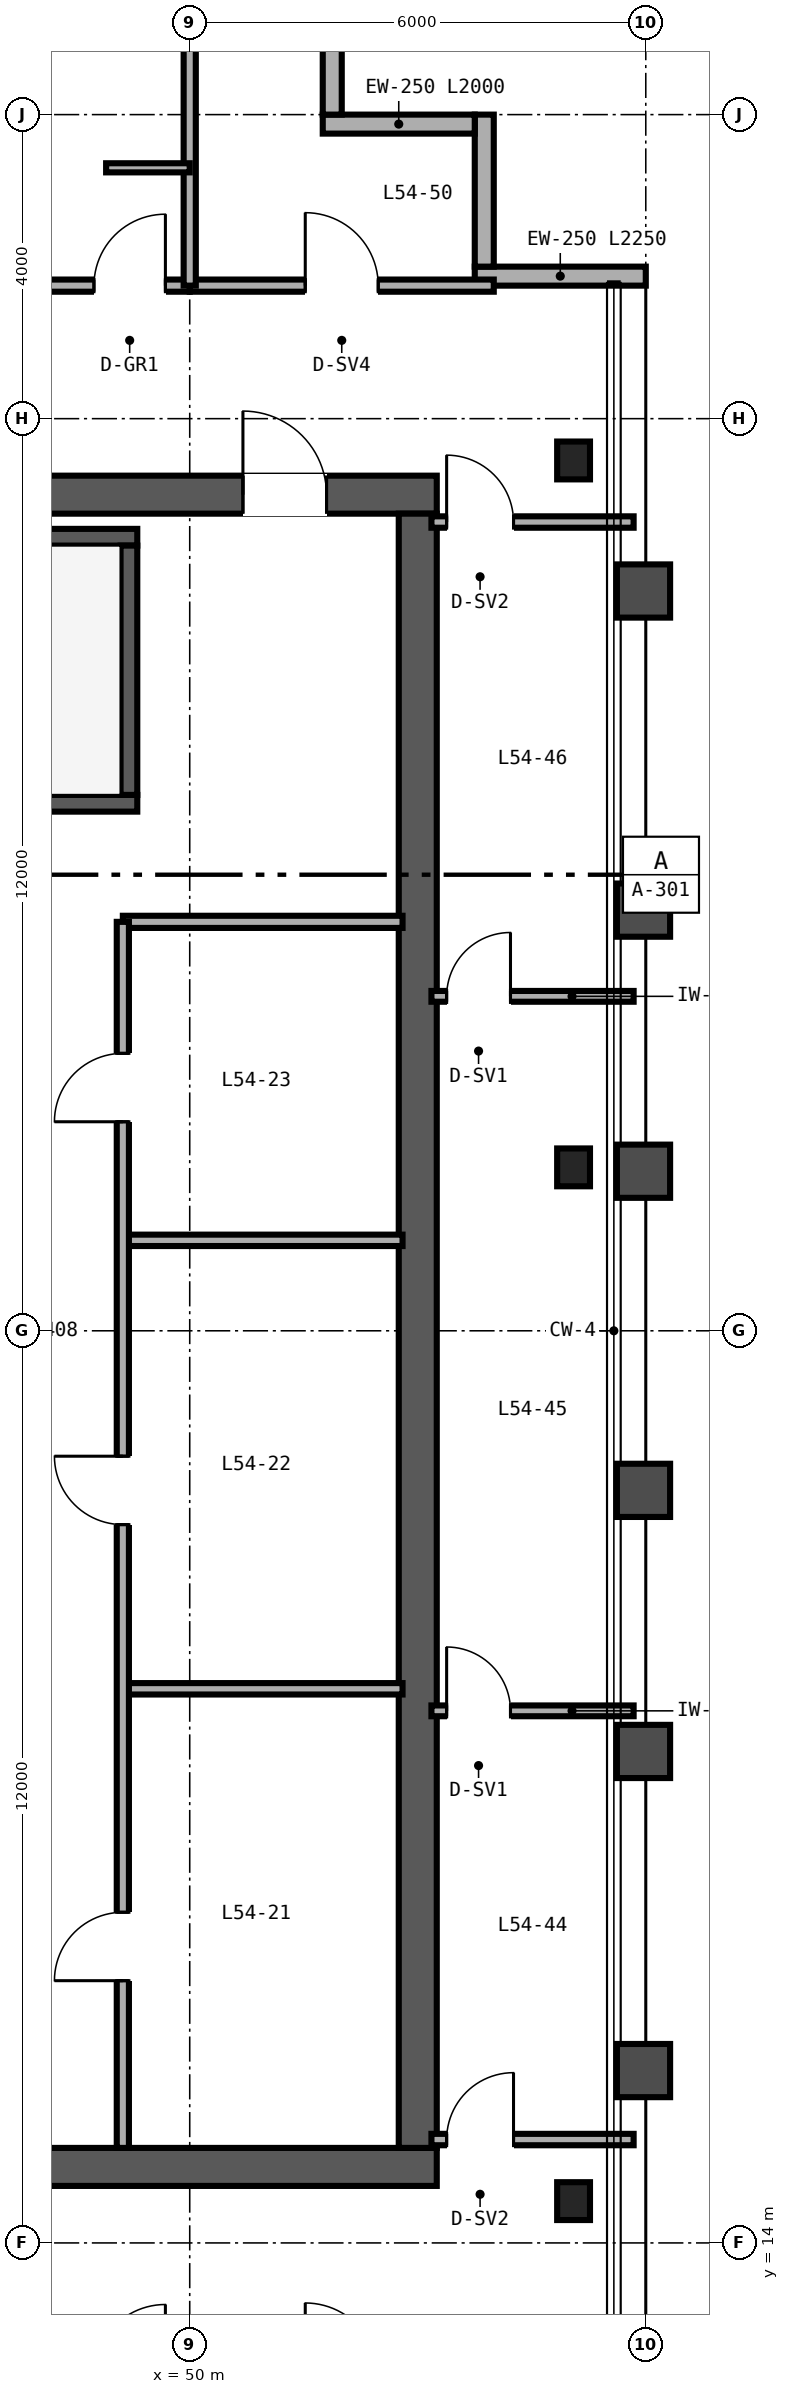
"""IFC4 building model, lengths in metres.
Left out: names, types, materials, properties, quantities, classifications, styles, units other than length and angle.
Written with IfcOpenShell. Run it as: python <this file> out.ifc"""

import sys

from ifc_helpers import new_model, si_unit, direction, frame, frame_2d, origin, origin_2d, place, context, subcontext, project, spatial, rectangle, i_section, extrude, source, transform, mapped, element, fill, save


model = new_model("IFC4")
c1 = context("Model", 3, precision=1e-05, world=origin(), true_north=direction((0.0, 1.0)))
c2 = subcontext(c1, "Body", "Model", "MODEL_VIEW")
j1 = project(units=[si_unit("LENGTHUNIT", "METRE"), si_unit("PLANEANGLEUNIT", "RADIAN")], contexts=[c1])
p1 = place(None, origin())
s1 = spatial("IfcSite", under=j1, at=p1, CompositionType="ELEMENT")
p2 = place(p1, origin())
s2 = spatial("IfcBuilding", under=s1, at=p2, CompositionType="ELEMENT")
p3 = place(p2, frame((0.0, 0.0, 213.6)))
s3 = spatial("IfcBuildingStorey", under=s2, at=p3, CompositionType="ELEMENT", Elevation=213.6)
p4 = place(p3, frame((40.75, 15.0, 0.0), z_axis=(0.0, 0.0, 1.0), x_axis=(1.0, 0.0, 0.0)))
e1 = element("IfcWall", 1, at=p4, inside=s3, PredefinedType="SHEAR", context=c2, shape_type="SweptSolid", body=[
    extrude(rectangle(XDim=12.5, YDim=0.5, at=frame_2d((6.25, 0.0))), origin(), (0.0, 0.0, 1.0), 3.37),
])
p5 = place(p4, frame((4.35, 0.0, 0.0)))
e2 = element("IfcOpeningElement", 2, at=p5, cuts=e1, PredefinedType="OPENING", context=c2, shape_type="SweptSolid", body=[
    extrude(rectangle(XDim=1.0, YDim=2.15, at=frame_2d((0.5, 1.075))), frame((0.0, 0.26, 0.0), z_axis=(0.0, -1.0, 0.0), x_axis=(1.0, 0.0, 0.0)), (0.0, 0.0, 1.0), 0.52),
])
p6 = place(p3, frame((40.75, 37.0, 0.0), z_axis=(0.0, 0.0, 1.0), x_axis=(1.0, 0.0, 0.0)))
e3 = element("IfcWall", 3, at=p6, inside=s3, PredefinedType="SHEAR", context=c2, shape_type="SweptSolid", body=[
    extrude(rectangle(XDim=12.5, YDim=0.5, at=frame_2d((6.25, 0.0))), origin(), (0.0, 0.0, 1.0), 3.37),
])
p7 = place(p6, frame((9.95, 0.0, 0.0)))
e4 = element("IfcOpeningElement", 4, at=p7, cuts=e3, PredefinedType="OPENING", context=c2, shape_type="SweptSolid", body=[
    extrude(rectangle(XDim=1.1, YDim=2.15, at=frame_2d((0.55, 1.075))), frame((0.0, 0.26, 0.0), z_axis=(0.0, -1.0, 0.0), x_axis=(1.0, 0.0, 0.0)), (0.0, 0.0, 1.0), 0.52),
])
p8 = place(p3, frame((53.0, 15.25, 0.0), z_axis=(0.0, 0.0, 1.0), x_axis=(0.0, 1.0, 0.0)))
e5 = element("IfcWall", 5, at=p8, inside=s3, PredefinedType="SHEAR", context=c2, shape_type="SweptSolid", body=[
    extrude(rectangle(XDim=21.5, YDim=0.5, at=frame_2d((10.75, 0.0))), origin(), (0.0, 0.0, 1.0), 3.37),
])
p9 = place(p3, frame((41.25, 32.94, 0.0), z_axis=(0.0, 0.0, 1.0), x_axis=(1.0, 0.0, 0.0)))
e6 = element("IfcWall", 6, at=p9, inside=s3, PredefinedType="SHEAR", context=c2, shape_type="SweptSolid", body=[
    extrude(rectangle(XDim=8.06, YDim=0.22, at=frame_2d((4.03, 0.0))), origin(), (0.0, 0.0, 1.0), 3.4),
])
p10 = place(p9, frame((0.67, 0.0, 0.0)))
e7 = element("IfcOpeningElement", 7, at=p10, cuts=e6, PredefinedType="OPENING", context=c2, shape_type="SweptSolid", body=[
    extrude(rectangle(XDim=1.05, YDim=2.15, at=frame_2d((0.525, 1.075))), frame((0.0, 0.12, 0.0), z_axis=(0.0, -1.0, 0.0), x_axis=(1.0, 0.0, 0.0)), (0.0, 0.0, 1.0), 0.24),
])
p11 = place(p3, frame((41.25, 36.44, 0.0), z_axis=(0.0, 0.0, 1.0), x_axis=(1.0, 0.0, 0.0)))
e8 = element("IfcWall", 8, at=p11, inside=s3, PredefinedType="SHEAR", context=c2, shape_type="SweptSolid", body=[
    extrude(rectangle(XDim=8.06, YDim=0.22, at=frame_2d((4.03, 0.0))), origin(), (0.0, 0.0, 1.0), 3.4),
])
p12 = place(p3, frame((49.2, 33.05, 0.0), z_axis=(0.0, 0.0, 1.0), x_axis=(0.0, 1.0, 0.0)))
e9 = element("IfcWall", 9, at=p12, inside=s3, PredefinedType="SHEAR", context=c2, shape_type="SweptSolid", body=[
    extrude(rectangle(XDim=3.28, YDim=0.22, at=frame_2d((1.64, 0.0))), origin(), (0.0, 0.0, 1.0), 3.4),
])
m1 = source(origin(), c2, "Body", "SweptSolid", [
    extrude(i_section(OverallWidth=0.432, OverallDepth=0.498, WebThickness=0.056, FlangeThickness=0.089, FilletRadius=0.025, at=origin_2d()), origin(), (0.0, 0.0, 1.0), 3.37),
])
for number, where, z_axis, x_axis in (
    (10, (55.05, 14.55, 0.0), (0.0, 0.0, 1.0), (1.0, 0.0, 0.0)),
    (11, (55.05, 28.15, 0.0), (0.0, 0.0, 1.0), (1.0, 0.0, 0.0)),
    (12, (55.05, 37.45, 0.0), (0.0, 0.0, 1.0), (1.0, 0.0, 0.0)),
):
    element("IfcColumn", number, at=place(p3, frame(where, z_axis=z_axis, x_axis=x_axis)), inside=s3, PredefinedType="COLUMN", context=c2, shape_type="MappedRepresentation", body=[
        mapped(m1, transform((0.0, 0.0, 0.0), scale=1.0)),
    ])
p13 = place(p3, frame((56.0, 39.875, 0.0), z_axis=(0.0, 0.0, 1.0), x_axis=(-1.0, 0.0, 0.0)))
e13 = element("IfcWall", 13, at=p13, inside=s3, PredefinedType="SOLIDWALL", context=c2, shape_type="SweptSolid", body=[
    extrude(rectangle(XDim=2.25, YDim=0.25, at=frame_2d((1.125, 0.0))), origin(), (0.0, 0.0, 1.0), 3.37),
])
for number, where, z_axis, x_axis in (
    (14, (53.875, 40.0, 0.0), (0.0, 0.0, 1.0), (0.0, 1.0, 0.0)),
    (15, (53.75, 41.875, 0.0), (0.0, 0.0, 1.0), (-1.0, 0.0, 0.0)),
    (16, (51.875, 42.0, 0.0), (0.0, 0.0, 1.0), (0.0, 1.0, 0.0)),
):
    element("IfcWall", number, at=place(p3, frame(where, z_axis=z_axis, x_axis=x_axis)), inside=s3, PredefinedType="SOLIDWALL", context=c2, shape_type="SweptSolid", body=[
        extrude(rectangle(XDim=2.0, YDim=0.25, at=frame_2d((1.0, 0.0))), origin(), (0.0, 0.0, 1.0), 3.37),
    ])
p14 = place(p3, frame((49.12, 31.38, 0.0), z_axis=(0.0, 0.0, 1.0), x_axis=(1.0, 0.0, 0.0)))
e17 = element("IfcWall", 17, at=p14, inside=s3, PredefinedType="PARTITIONING", context=c2, shape_type="SweptSolid", body=[
    extrude(rectangle(XDim=3.68, YDim=0.16, at=frame_2d((1.84, 0.0))), origin(), (0.0, 0.0, 1.0), 2.47),
])
for number, where, z_axis, x_axis in (
    (18, (49.12, 21.29, 0.0), (0.0, 0.0, 1.0), (1.0, 0.0, 0.0)),
    (19, (49.12, 27.19, 0.0), (0.0, 0.0, 1.0), (1.0, 0.0, 0.0)),
):
    element("IfcWall", number, at=place(p3, frame(where, z_axis=z_axis, x_axis=x_axis)), inside=s3, PredefinedType="PARTITIONING", context=c2, shape_type="SweptSolid", body=[
        extrude(rectangle(XDim=3.68, YDim=0.15, at=frame_2d((1.84, 0.0))), origin(), (0.0, 0.0, 1.0), 3.37),
    ])
p15 = place(p3, frame((49.12, 15.25, 0.0), z_axis=(0.0, 0.0, 1.0), x_axis=(0.0, 1.0, 0.0)))
e20 = element("IfcWall", 20, at=p15, inside=s3, PredefinedType="PARTITIONING", context=c2, shape_type="SweptSolid", body=[
    extrude(rectangle(XDim=16.13, YDim=0.16, at=frame_2d((8.065, 0.0))), origin(), (0.0, 0.0, 1.0), 2.443),
])
p16 = place(p15, frame((2.2, 0.0, 0.0)))
e21 = element("IfcOpeningElement", 21, at=p16, cuts=e20, PredefinedType="OPENING", context=c2, shape_type="SweptSolid", body=[
    extrude(rectangle(XDim=0.9, YDim=2.15, at=frame_2d((0.45, 1.075))), frame((0.0, 0.09, 0.0), z_axis=(0.0, -1.0, 0.0), x_axis=(1.0, 0.0, 0.0)), (0.0, 0.0, 1.0), 0.18),
])
p17 = place(p15, frame((8.2, 0.0, 0.0)))
e22 = element("IfcOpeningElement", 22, at=p17, cuts=e20, PredefinedType="OPENING", context=c2, shape_type="SweptSolid", body=[
    extrude(rectangle(XDim=0.9, YDim=2.15, at=frame_2d((0.45, 1.075))), frame((0.0, 0.09, 0.0), z_axis=(0.0, -1.0, 0.0), x_axis=(1.0, 0.0, 0.0)), (0.0, 0.0, 1.0), 0.18),
])
p18 = place(p15, frame((13.5, 0.0, 0.0)))
e23 = element("IfcOpeningElement", 23, at=p18, cuts=e20, PredefinedType="OPENING", context=c2, shape_type="SweptSolid", body=[
    extrude(rectangle(XDim=0.9, YDim=2.15, at=frame_2d((0.45, 1.075))), frame((0.0, 0.09, 0.0), z_axis=(0.0, -1.0, 0.0), x_axis=(1.0, 0.0, 0.0)), (0.0, 0.0, 1.0), 0.18),
])
p19 = place(p3, frame((53.18, 15.36, 0.0), z_axis=(0.0, 0.0, 1.0), x_axis=(1.0, 0.0, 0.0)))
e24 = element("IfcWall", 24, at=p19, inside=s3, PredefinedType="PARTITIONING", context=c2, shape_type="SweptSolid", body=[
    extrude(rectangle(XDim=2.66, YDim=0.15, at=frame_2d((1.33, 0.0))), origin(), (0.0, 0.0, 1.0), 2.591),
])
p20 = place(p19, frame((0.2, 0.0, 0.0)))
e25 = element("IfcOpeningElement", 25, at=p20, cuts=e24, PredefinedType="OPENING", context=c2, shape_type="SweptSolid", body=[
    extrude(rectangle(XDim=0.88, YDim=2.15, at=frame_2d((0.44, 1.075))), frame((0.0, 0.085, 0.0), z_axis=(0.0, -1.0, 0.0), x_axis=(1.0, 0.0, 0.0)), (0.0, 0.0, 1.0), 0.17),
])
p21 = place(p3, frame((53.18, 36.64, 0.0), z_axis=(0.0, 0.0, 1.0), x_axis=(1.0, 0.0, 0.0)))
e26 = element("IfcWall", 26, at=p21, inside=s3, PredefinedType="PARTITIONING", context=c2, shape_type="SweptSolid", body=[
    extrude(rectangle(XDim=2.66, YDim=0.15, at=frame_2d((1.33, 0.0))), origin(), (0.0, 0.0, 1.0), 2.753),
])
p22 = place(p21, frame((0.2, 0.0, 0.0)))
e27 = element("IfcOpeningElement", 27, at=p22, cuts=e26, PredefinedType="OPENING", context=c2, shape_type="SweptSolid", body=[
    extrude(rectangle(XDim=0.88, YDim=2.15, at=frame_2d((0.44, 1.075))), frame((0.0, 0.085, 0.0), z_axis=(0.0, -1.0, 0.0), x_axis=(1.0, 0.0, 0.0)), (0.0, 0.0, 1.0), 0.17),
])
p23 = place(p3, frame((53.18, 21.0, 0.0), z_axis=(0.0, 0.0, 1.0), x_axis=(1.0, 0.0, 0.0)))
e28 = element("IfcWall", 28, at=p23, inside=s3, PredefinedType="PARTITIONING", context=c2, shape_type="SweptSolid", body=[
    extrude(rectangle(XDim=2.66, YDim=0.142, at=frame_2d((1.33, 0.0))), origin(), (0.0, 0.0, 1.0), 2.591),
])
p24 = place(p23, frame((0.2, 0.0, 0.0)))
e29 = element("IfcOpeningElement", 29, at=p24, cuts=e28, PredefinedType="OPENING", context=c2, shape_type="SweptSolid", body=[
    extrude(rectangle(XDim=0.84, YDim=2.1, at=frame_2d((0.42, 1.05))), frame((0.0, 0.081, 0.0), z_axis=(0.0, -1.0, 0.0), x_axis=(1.0, 0.0, 0.0)), (0.0, 0.0, 1.0), 0.162),
])
p25 = place(p3, frame((53.18, 30.4, 0.0), z_axis=(0.0, 0.0, 1.0), x_axis=(1.0, 0.0, 0.0)))
e30 = element("IfcWall", 30, at=p25, inside=s3, PredefinedType="PARTITIONING", context=c2, shape_type="SweptSolid", body=[
    extrude(rectangle(XDim=2.66, YDim=0.142, at=frame_2d((1.33, 0.0))), origin(), (0.0, 0.0, 1.0), 2.753),
])
p26 = place(p25, frame((0.2, 0.0, 0.0)))
e31 = element("IfcOpeningElement", 31, at=p26, cuts=e30, PredefinedType="OPENING", context=c2, shape_type="SweptSolid", body=[
    extrude(rectangle(XDim=0.84, YDim=2.1, at=frame_2d((0.42, 1.05))), frame((0.0, 0.081, 0.0), z_axis=(0.0, -1.0, 0.0), x_axis=(1.0, 0.0, 0.0)), (0.0, 0.0, 1.0), 0.162),
])
p27 = place(p3, frame((50.0, 39.75, 0.0), z_axis=(0.0, 0.0, 1.0), x_axis=(1.0, 0.0, 0.0)))
e32 = element("IfcWall", 32, at=p27, inside=s3, PredefinedType="PARTITIONING", context=c2, shape_type="SweptSolid", body=[
    extrude(rectangle(XDim=4.0, YDim=0.16, at=frame_2d((2.0, 0.0))), origin(), (0.0, 0.0, 1.0), 3.37),
])
p28 = place(p27, frame((1.52, 0.0, 0.0)))
e33 = element("IfcOpeningElement", 33, at=p28, cuts=e32, PredefinedType="OPENING", context=c2, shape_type="SweptSolid", body=[
    extrude(rectangle(XDim=0.96, YDim=2.15, at=frame_2d((0.48, 1.075))), frame((0.0, 0.09, 0.0), z_axis=(0.0, -1.0, 0.0), x_axis=(1.0, 0.0, 0.0)), (0.0, 0.0, 1.0), 0.18),
])
p29 = place(p3, frame((14.0, 39.75, 0.0), z_axis=(0.0, 0.0, 1.0), x_axis=(1.0, 0.0, 0.0)))
e34 = element("IfcWall", 34, at=p29, inside=s3, PredefinedType="PARTITIONING", context=c2, shape_type="SweptSolid", body=[
    extrude(rectangle(XDim=36.0, YDim=0.16, at=frame_2d((18.0, 0.0))), origin(), (0.0, 0.0, 1.0), 2.913),
])
p30 = place(p29, frame((9.2, 0.0, 0.0)))
e35 = element("IfcOpeningElement", 35, at=p30, cuts=e34, PredefinedType="OPENING", context=c2, shape_type="SweptSolid", body=[
    extrude(rectangle(XDim=0.98, YDim=2.2, at=frame_2d((0.49, 1.1))), frame((0.0, 0.09, 0.0), z_axis=(0.0, -1.0, 0.0), x_axis=(1.0, 0.0, 0.0)), (0.0, 0.0, 1.0), 0.18),
])
p31 = place(p29, frame((19.2, 0.0, 0.0)))
e36 = element("IfcOpeningElement", 36, at=p31, cuts=e34, PredefinedType="OPENING", context=c2, shape_type="SweptSolid", body=[
    extrude(rectangle(XDim=0.98, YDim=2.2, at=frame_2d((0.49, 1.1))), frame((0.0, 0.09, 0.0), z_axis=(0.0, -1.0, 0.0), x_axis=(1.0, 0.0, 0.0)), (0.0, 0.0, 1.0), 0.18),
])
p32 = place(p29, frame((24.52, 0.0, 0.0)))
e37 = element("IfcOpeningElement", 37, at=p32, cuts=e34, PredefinedType="OPENING", context=c2, shape_type="SweptSolid", body=[
    extrude(rectangle(XDim=0.96, YDim=2.15, at=frame_2d((0.48, 1.075))), frame((0.0, 0.09, 0.0), z_axis=(0.0, -1.0, 0.0), x_axis=(1.0, 0.0, 0.0)), (0.0, 0.0, 1.0), 0.18),
])
p33 = place(p29, frame((34.74, 0.0, 0.0)))
e38 = element("IfcOpeningElement", 38, at=p33, cuts=e34, PredefinedType="OPENING", context=c2, shape_type="SweptSolid", body=[
    extrude(rectangle(XDim=0.94, YDim=2.15, at=frame_2d((0.47, 1.075))), frame((0.0, 0.09, 0.0), z_axis=(0.0, -1.0, 0.0), x_axis=(1.0, 0.0, 0.0)), (0.0, 0.0, 1.0), 0.18),
])
p34 = place(p3, frame((50.0, 39.75, 0.0), z_axis=(0.0, 0.0, 1.0), x_axis=(0.0, 1.0, 0.0)))
e39 = element("IfcWall", 39, at=p34, inside=s3, PredefinedType="PARTITIONING", context=c2, shape_type="SweptSolid", body=[
    extrude(rectangle(XDim=5.89, YDim=0.16, at=frame_2d((2.945, 0.0))), origin(), (0.0, 0.0, 1.0), 2.677),
])
p35 = place(p3, frame((48.9, 41.3, 0.0), z_axis=(0.0, 0.0, 1.0), x_axis=(1.0, 0.0, 0.0)))
e40 = element("IfcWall", 40, at=p35, inside=s3, PredefinedType="PARTITIONING", context=c2, shape_type="SweptSolid", body=[
    extrude(rectangle(XDim=1.1, YDim=0.12, at=frame_2d((0.55, 0.0))), origin(), (0.0, 0.0, 1.0), 3.37),
])
m2 = source(origin(), c2, "Body", "SweptSolid", [
    extrude(rectangle(XDim=1.1, YDim=2.15, at=frame_2d((0.55, 1.075))), frame((0.0, 0.025, 0.0), z_axis=(0.0, -1.0, 0.0), x_axis=(1.0, 0.0, 0.0)), (0.0, 0.0, 1.0), 0.05),
])
p36 = place(p7, origin())
e41 = element("IfcDoor", 41, at=p36, inside=s3, OperationType="SINGLE_SWING_LEFT", PredefinedType="DOOR", context=c2, shape_type="MappedRepresentation", body=[
    mapped(m2, transform((0.0, 0.0, 0.0), scale=1.0)),
])
fill(e4, e41)
m3 = source(origin(), c2, "Body", "SweptSolid", [
    extrude(rectangle(XDim=0.9, YDim=2.15, at=frame_2d((0.45, 1.075))), frame((0.0, 0.025, 0.0), z_axis=(0.0, -1.0, 0.0), x_axis=(1.0, 0.0, 0.0)), (0.0, 0.0, 1.0), 0.05),
])
p37 = place(p16, origin())
e42 = element("IfcDoor", 42, at=p37, inside=s3, OperationType="SINGLE_SWING_LEFT", PredefinedType="DOOR", context=c2, shape_type="MappedRepresentation", body=[
    mapped(m3, transform((0.0, 0.0, 0.0), scale=1.0)),
])
fill(e21, e42)
p38 = place(p17, origin())
e43 = element("IfcDoor", 43, at=p38, inside=s3, OperationType="SINGLE_SWING_RIGHT", PredefinedType="DOOR", context=c2, shape_type="MappedRepresentation", body=[
    mapped(m3, transform((0.0, 0.0, 0.0), scale=1.0)),
])
fill(e22, e43)
p39 = place(p18, origin())
e44 = element("IfcDoor", 44, at=p39, inside=s3, OperationType="SINGLE_SWING_LEFT", PredefinedType="DOOR", context=c2, shape_type="MappedRepresentation", body=[
    mapped(m3, transform((0.0, 0.0, 0.0), scale=1.0)),
])
fill(e23, e44)
m4 = source(origin(), c2, "Body", "SweptSolid", [
    extrude(rectangle(XDim=0.88, YDim=2.15, at=frame_2d((0.44, 1.075))), frame((0.0, 0.025, 0.0), z_axis=(0.0, -1.0, 0.0), x_axis=(1.0, 0.0, 0.0)), (0.0, 0.0, 1.0), 0.05),
])
p40 = place(p20, origin())
e45 = element("IfcDoor", 45, at=p40, inside=s3, OperationType="SINGLE_SWING_RIGHT", PredefinedType="DOOR", context=c2, shape_type="MappedRepresentation", body=[
    mapped(m4, transform((0.0, 0.0, 0.0), scale=1.0)),
])
fill(e25, e45)
p41 = place(p22, origin())
e46 = element("IfcDoor", 46, at=p41, inside=s3, OperationType="SINGLE_SWING_LEFT", PredefinedType="DOOR", context=c2, shape_type="MappedRepresentation", body=[
    mapped(m4, transform((0.0, 0.0, 0.0), scale=1.0)),
])
fill(e27, e46)
m5 = source(origin(), c2, "Body", "SweptSolid", [
    extrude(rectangle(XDim=0.84, YDim=2.1, at=frame_2d((0.42, 1.05))), frame((0.0, 0.025, 0.0), z_axis=(0.0, -1.0, 0.0), x_axis=(1.0, 0.0, 0.0)), (0.0, 0.0, 1.0), 0.05),
])
p42 = place(p24, origin())
e47 = element("IfcDoor", 47, at=p42, inside=s3, OperationType="SINGLE_SWING_LEFT", PredefinedType="DOOR", context=c2, shape_type="MappedRepresentation", body=[
    mapped(m5, transform((0.0, 0.0, 0.0), scale=1.0)),
])
fill(e29, e47)
p43 = place(p26, origin())
e48 = element("IfcDoor", 48, at=p43, inside=s3, OperationType="SINGLE_SWING_RIGHT", PredefinedType="DOOR", context=c2, shape_type="MappedRepresentation", body=[
    mapped(m5, transform((0.0, 0.0, 0.0), scale=1.0)),
])
fill(e31, e48)
m6 = source(origin(), c2, "Body", "SweptSolid", [
    extrude(rectangle(XDim=0.96, YDim=2.15, at=frame_2d((0.48, 1.075))), frame((0.0, 0.025, 0.0), z_axis=(0.0, -1.0, 0.0), x_axis=(1.0, 0.0, 0.0)), (0.0, 0.0, 1.0), 0.05),
])
p44 = place(p28, origin())
e49 = element("IfcDoor", 49, at=p44, inside=s3, OperationType="SINGLE_SWING_LEFT", PredefinedType="DOOR", context=c2, shape_type="MappedRepresentation", body=[
    mapped(m6, transform((0.0, 0.0, 0.0), scale=1.0)),
])
fill(e33, e49)
m7 = source(origin(), c2, "Body", "SweptSolid", [
    extrude(rectangle(XDim=0.94, YDim=2.15, at=frame_2d((0.47, 1.075))), frame((0.0, 0.025, 0.0), z_axis=(0.0, -1.0, 0.0), x_axis=(1.0, 0.0, 0.0)), (0.0, 0.0, 1.0), 0.05),
])
p45 = place(p33, origin())
e50 = element("IfcDoor", 50, at=p45, inside=s3, OperationType="SINGLE_SWING_RIGHT", PredefinedType="DOOR", context=c2, shape_type="MappedRepresentation", body=[
    mapped(m7, transform((0.0, 0.0, 0.0), scale=1.0)),
])
fill(e38, e50)
save(model, sys.argv[1])
